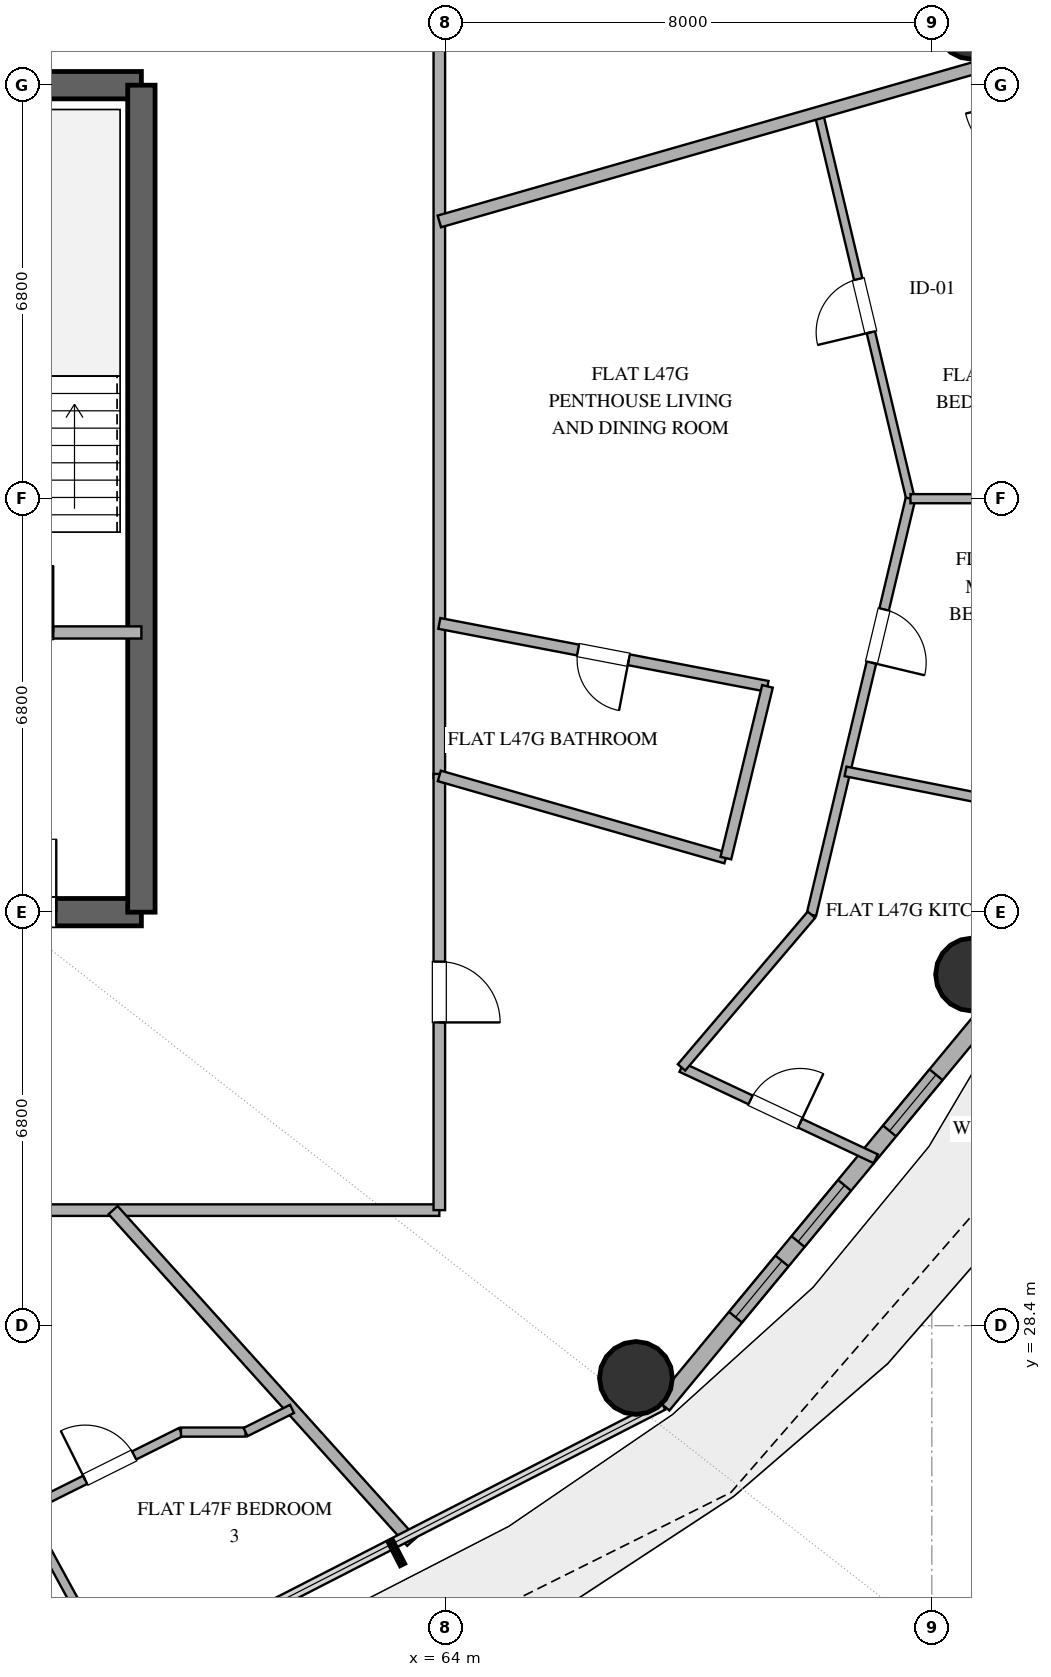
"""IFC4 building model, lengths in metres.
Left out: names, types, materials, properties, quantities, classifications, styles, units other than length and angle.
Written with IfcOpenShell. Run it as: python <this file> out.ifc"""

import sys

from ifc_helpers import new_model, si_unit, direction, frame, frame_2d, origin, origin_2d, place, context, subcontext, project, spatial, rectangle, hollow_circle, extrude, element, fill, save


model = new_model("IFC4")
c1 = context("Model", 3, precision=1e-05, world=origin(), true_north=direction((0.0, 1.0)))
c2 = subcontext(c1, "Body", "Model", "MODEL_VIEW")
j1 = project(units=[si_unit("LENGTHUNIT", "METRE"), si_unit("PLANEANGLEUNIT", "RADIAN")], contexts=[c1])
p1 = place(None, origin())
s1 = spatial("IfcSite", under=j1, at=p1, CompositionType="ELEMENT")
p2 = place(p1, origin())
s2 = spatial("IfcBuilding", under=s1, at=p2, CompositionType="ELEMENT")
p3 = place(p2, frame((0.0, 0.0, 186.6)))
s3 = spatial("IfcBuildingStorey", under=s2, at=p3, CompositionType="ELEMENT", Elevation=186.6)
p4 = place(p3, frame((55.0, 35.2, 0.0), z_axis=(0.0, 0.0, 1.0), x_axis=(1.0, 0.0, 0.0)))
e1 = element("IfcWall", 1, at=p4, inside=s3, PredefinedType="SHEAR", context=c2, shape_type="SweptSolid", body=[
    extrude(rectangle(XDim=4.0, YDim=0.45, at=frame_2d((2.0, 0.0))), origin(), (0.0, 0.0, 1.0), 3.38),
])
p5 = place(p4, frame((1.4, 0.0, 0.0)))
e2 = element("IfcOpeningElement", 2, at=p5, cuts=e1, PredefinedType="OPENING", context=c2, shape_type="SweptSolid", body=[
    extrude(rectangle(XDim=1.2, YDim=2.15, at=frame_2d((0.6, 1.075))), frame((0.0, 0.235, 0.0), z_axis=(0.0, -1.0, 0.0), x_axis=(1.0, 0.0, 0.0)), (0.0, 0.0, 1.0), 0.47),
])
p6 = place(p3, frame((55.0, 48.8, 0.0), z_axis=(0.0, 0.0, 1.0), x_axis=(1.0, 0.0, 0.0)))
e3 = element("IfcWall", 3, at=p6, inside=s3, PredefinedType="SHEAR", context=c2, shape_type="SweptSolid", body=[
    extrude(rectangle(XDim=4.0, YDim=0.45, at=frame_2d((2.0, 0.0))), origin(), (0.0, 0.0, 1.0), 3.38),
])
p7 = place(p3, frame((59.0, 35.2, 0.0), z_axis=(0.0, 0.0, 1.0), x_axis=(0.0, 1.0, 0.0)))
e4 = element("IfcWall", 4, at=p7, inside=s3, PredefinedType="SHEAR", context=c2, shape_type="SweptSolid", body=[
    extrude(rectangle(XDim=13.6, YDim=0.45, at=frame_2d((6.8, 0.0))), origin(), (0.0, 0.0, 1.0), 3.38),
])
for number, where, z_axis, x_axis in (
    (5, (72.662, 49.826, 0.0), (0.0, 0.0, 1.0), (1.0, 0.0, 0.0)),
    (6, (67.134, 27.54, 0.0), (0.0, 0.0, 1.0), (1.0, 0.0, 0.0)),
    (7, (72.662, 34.174, 0.0), (0.0, 0.0, 1.0), (1.0, 0.0, 0.0)),
):
    element("IfcColumn", number, at=place(p3, frame(where, z_axis=z_axis, x_axis=x_axis)), inside=s3, PredefinedType="COLUMN", context=c2, shape_type="SweptSolid", body=[
        extrude(hollow_circle(Radius=0.6, WallThickness=0.032, at=origin_2d()), origin(), (0.0, 0.0, 1.0), 3.38),
    ])
p8 = place(p3, frame((67.576, 27.094, 0.0), z_axis=(0.0, 0.0, 1.0), x_axis=(0.637333477683, 0.770588111915, 0.0)))
e8 = element("IfcWall", 8, at=p8, inside=s3, PredefinedType="SOLIDWALL", context=c2, shape_type="SweptSolid", body=[
    extrude(rectangle(XDim=8.875, YDim=0.28, at=frame_2d((4.438, 0.0))), origin(), (0.0, 0.0, 1.0), 3.38),
])
p9 = place(p8, frame((1.875, 0.0, 0.85)))
e9 = element("IfcOpeningElement", 9, at=p9, cuts=e8, PredefinedType="OPENING", context=c2, shape_type="SweptSolid", body=[
    extrude(rectangle(XDim=1.2, YDim=1.8, at=frame_2d((0.6, 0.9))), frame((0.0, 0.15, 0.0), z_axis=(0.0, -1.0, 0.0), x_axis=(1.0, 0.0, 0.0)), (0.0, 0.0, 1.0), 0.3),
])
p10 = place(p8, frame((3.489, 0.0, 0.85)))
e10 = element("IfcOpeningElement", 10, at=p10, cuts=e8, PredefinedType="OPENING", context=c2, shape_type="SweptSolid", body=[
    extrude(rectangle(XDim=1.2, YDim=1.8, at=frame_2d((0.6, 0.9))), frame((0.0, 0.15, 0.0), z_axis=(0.0, -1.0, 0.0), x_axis=(1.0, 0.0, 0.0)), (0.0, 0.0, 1.0), 0.3),
])
p11 = place(p8, frame((5.85, 0.0, 0.85)))
e11 = element("IfcOpeningElement", 11, at=p11, cuts=e8, PredefinedType="OPENING", context=c2, shape_type="SweptSolid", body=[
    extrude(rectangle(XDim=1.2, YDim=1.6, at=frame_2d((0.6, 0.8))), frame((0.0, 0.15, 0.0), z_axis=(0.0, -1.0, 0.0), x_axis=(1.0, 0.0, 0.0)), (0.0, 0.0, 1.0), 0.3),
])
p12 = place(p3, frame((55.0, 39.8, 0.0), z_axis=(0.0, 0.0, 1.0), x_axis=(1.0, 0.0, 0.0)))
e12 = element("IfcWall", 12, at=p12, inside=s3, PredefinedType="SOLIDWALL", context=c2, shape_type="SweptSolid", body=[
    extrude(rectangle(XDim=4.0, YDim=0.2, at=frame_2d((2.0, 0.0))), origin(), (0.0, 0.0, 1.0), 2.74),
])
p13 = place(p12, frame((1.45, 0.0, 0.0)))
e13 = element("IfcOpeningElement", 13, at=p13, cuts=e12, PredefinedType="OPENING", context=c2, shape_type="SweptSolid", body=[
    extrude(rectangle(XDim=1.1, YDim=2.15, at=frame_2d((0.55, 1.075))), frame((0.0, 0.11, 0.0), z_axis=(0.0, -1.0, 0.0), x_axis=(1.0, 0.0, 0.0)), (0.0, 0.0, 1.0), 0.22),
])
p14 = place(p3, frame((46.818, 30.3, 0.0), z_axis=(0.0, 0.0, 1.0), x_axis=(1.0, 0.0, 0.0)))
e14 = element("IfcWall", 14, at=p14, inside=s3, PredefinedType="PARTITIONING", context=c2, shape_type="SweptSolid", body=[
    extrude(rectangle(XDim=17.082, YDim=0.19, at=frame_2d((8.541, 0.0))), origin(), (0.0, 0.0, 1.0), 2.74),
])
p15 = place(p14, frame((5.358, 0.0, 0.0)))
e15 = element("IfcOpeningElement", 15, at=p15, cuts=e14, PredefinedType="OPENING", context=c2, shape_type="SweptSolid", body=[
    extrude(rectangle(XDim=1.0, YDim=2.2, at=frame_2d((0.5, 1.1))), frame((0.0, 0.105, 0.0), z_axis=(0.0, -1.0, 0.0), x_axis=(1.0, 0.0, 0.0)), (0.0, 0.0, 1.0), 0.21),
])
p16 = place(p3, frame((63.9, 53.7, 0.0), z_axis=(0.0, 0.0, 1.0), x_axis=(0.0, -1.0, 0.0)))
e16 = element("IfcWall", 16, at=p16, inside=s3, PredefinedType="PARTITIONING", context=c2, shape_type="SweptSolid", body=[
    extrude(rectangle(XDim=16.292, YDim=0.19, at=frame_2d((8.146, 0.0))), origin(), (0.0, 0.0, 1.0), 2.74),
])
p17 = place(p16, frame((3.087, 0.0, 0.0)))
e17 = element("IfcOpeningElement", 17, at=p17, cuts=e16, PredefinedType="OPENING", context=c2, shape_type="SweptSolid", body=[
    extrude(rectangle(XDim=1.0, YDim=2.2, at=frame_2d((0.5, 1.1))), frame((0.0, 0.105, 0.0), z_axis=(0.0, -1.0, 0.0), x_axis=(1.0, 0.0, 0.0)), (0.0, 0.0, 1.0), 0.21),
])
p18 = place(p3, frame((63.9, 37.474, 0.0), z_axis=(0.0, 0.0, 1.0), x_axis=(0.0, -1.0, 0.0)))
e18 = element("IfcWall", 18, at=p18, inside=s3, PredefinedType="PARTITIONING", context=c2, shape_type="SweptSolid", body=[
    extrude(rectangle(XDim=7.174, YDim=0.19, at=frame_2d((3.587, 0.0))), origin(), (0.0, 0.0, 1.0), 2.74),
])
p19 = place(p18, frame((3.087, 0.0, 0.0)))
e19 = element("IfcOpeningElement", 19, at=p19, cuts=e18, PredefinedType="OPENING", context=c2, shape_type="SweptSolid", body=[
    extrude(rectangle(XDim=1.0, YDim=2.2, at=frame_2d((0.5, 1.1))), frame((0.0, 0.105, 0.0), z_axis=(0.0, -1.0, 0.0), x_axis=(1.0, 0.0, 0.0)), (0.0, 0.0, 1.0), 0.21),
])
p20 = place(p3, frame((71.649, 42.0, 0.0), z_axis=(0.0, 0.0, 1.0), x_axis=(-0.231639074409, 0.972801798522, 0.0)))
e20 = element("IfcWall", 20, at=p20, inside=s3, PredefinedType="PARTITIONING", context=c2, shape_type="SweptSolid", body=[
    extrude(rectangle(XDim=6.525, YDim=0.14, at=frame_2d((3.263, 0.0))), origin(), (0.0, 0.0, 1.0), 2.74),
])
p21 = place(p20, frame((2.812, 0.0, 0.0)))
e21 = element("IfcOpeningElement", 21, at=p21, cuts=e20, PredefinedType="OPENING", context=c2, shape_type="SweptSolid", body=[
    extrude(rectangle(XDim=0.9, YDim=2.1, at=frame_2d((0.45, 1.05))), frame((0.0, 0.08, 0.0), z_axis=(0.0, -1.0, 0.0), x_axis=(1.0, 0.0, 0.0)), (0.0, 0.0, 1.0), 0.16),
])
p22 = place(p3, frame((73.528, 49.32, 0.0), z_axis=(0.0, 0.0, 1.0), x_axis=(-0.961265987417, -0.275622389211, 0.0)))
e22 = element("IfcWall", 22, at=p22, inside=s3, PredefinedType="PARTITIONING", context=c2, shape_type="SweptSolid", body=[
    extrude(rectangle(XDim=10.016, YDim=0.2, at=frame_2d((5.008, 0.0))), origin(), (0.0, 0.0, 1.0), 2.74),
])
p23 = place(p3, frame((69.297, 38.914, 0.0), z_axis=(0.0, 0.0, 1.0), x_axis=(-0.982108019882, 0.188318446478, 0.0)))
e23 = element("IfcWall", 23, at=p23, inside=s3, PredefinedType="PLUMBINGWALL", context=c2, shape_type="SweptSolid", body=[
    extrude(rectangle(XDim=5.496, YDim=0.18, at=frame_2d((2.748, 0.0))), origin(), (0.0, 0.0, 1.0), 2.74),
])
p24 = place(p23, frame((2.323, 0.0, 0.0)))
e24 = element("IfcOpeningElement", 24, at=p24, cuts=e23, PredefinedType="OPENING", context=c2, shape_type="SweptSolid", body=[
    extrude(rectangle(XDim=0.85, YDim=2.1, at=frame_2d((0.425, 1.05))), frame((0.0, 0.1, 0.0), z_axis=(0.0, -1.0, 0.0), x_axis=(1.0, 0.0, 0.0)), (0.0, 0.0, 1.0), 0.2),
])
p25 = place(p3, frame((63.9, 37.441, 0.0), z_axis=(0.0, 0.0, 1.0), x_axis=(0.961266088446, -0.27562203686, 0.0)))
e25 = element("IfcWall", 25, at=p25, inside=s3, PredefinedType="PLUMBINGWALL", context=c2, shape_type="SweptSolid", body=[
    extrude(rectangle(XDim=4.903, YDim=0.18, at=frame_2d((2.451, 0.0))), origin(), (0.0, 0.0, 1.0), 2.74),
])
p26 = place(p3, frame((71.649, 42.0, 0.0), z_axis=(0.0, 0.0, 1.0), x_axis=(-0.231625219966, -0.972805097373, 0.0)))
e26 = element("IfcWall", 26, at=p26, inside=s3, PredefinedType="PLUMBINGWALL", context=c2, shape_type="SweptSolid", body=[
    extrude(rectangle(XDim=7.033, YDim=0.16, at=frame_2d((3.517, 0.0))), origin(), (0.0, 0.0, 1.0), 2.74),
])
p27 = place(p26, frame((1.871, 0.0, 0.0)))
e27 = element("IfcOpeningElement", 27, at=p27, cuts=e26, PredefinedType="OPENING", context=c2, shape_type="SweptSolid", body=[
    extrude(rectangle(XDim=0.9, YDim=2.1, at=frame_2d((0.45, 1.05))), frame((0.0, 0.09, 0.0), z_axis=(0.0, -1.0, 0.0), x_axis=(1.0, 0.0, 0.0)), (0.0, 0.0, 1.0), 0.18),
])
p28 = place(p3, frame((63.445, 24.846, 0.0), z_axis=(0.0, 0.0, 1.0), x_axis=(-0.669111750453, 0.743161802979, 0.0)))
e28 = element("IfcWall", 28, at=p28, inside=s3, PredefinedType="PARTITIONING", context=c2, shape_type="SweptSolid", body=[
    extrude(rectangle(XDim=7.339, YDim=0.2, at=frame_2d((3.669, 0.0))), origin(), (0.0, 0.0, 1.0), 2.74),
])
p29 = place(p3, frame((75.219, 42.0, 0.0), z_axis=(0.0, 0.0, 1.0), x_axis=(-1.0, 0.0, 0.0)))
e29 = element("IfcWall", 29, at=p29, inside=s3, PredefinedType="PARTITIONING", context=c2, shape_type="SweptSolid", body=[
    extrude(rectangle(XDim=3.571, YDim=0.15, at=frame_2d((1.785, 0.0))), origin(), (0.0, 0.0, 1.0), 2.74),
])
p30 = place(p3, frame((67.883, 32.647, 0.0), z_axis=(0.0, 0.0, 1.0), x_axis=(0.904904903403, -0.425613810628, 0.0)))
e30 = element("IfcWall", 30, at=p30, inside=s3, PredefinedType="PLUMBINGWALL", context=c2, shape_type="SweptSolid", body=[
    extrude(rectangle(XDim=3.53, YDim=0.16, at=frame_2d((1.765, 0.0))), origin(), (0.0, 0.0, 1.0), 2.74),
])
p31 = place(p30, frame((1.255, 0.0, 0.0)))
e31 = element("IfcOpeningElement", 31, at=p31, cuts=e30, PredefinedType="OPENING", context=c2, shape_type="SweptSolid", body=[
    extrude(rectangle(XDim=0.9, YDim=2.1, at=frame_2d((0.45, 1.05))), frame((0.0, 0.09, 0.0), z_axis=(0.0, -1.0, 0.0), x_axis=(1.0, 0.0, 0.0)), (0.0, 0.0, 1.0), 0.18),
])
p32 = place(p3, frame((74.026, 36.831, 0.0), z_axis=(0.0, 0.0, 1.0), x_axis=(-0.980839121604, 0.194819448544, 0.0)))
e32 = element("IfcWall", 32, at=p32, inside=s3, PredefinedType="PLUMBINGWALL", context=c2, shape_type="SweptSolid", body=[
    extrude(rectangle(XDim=3.513, YDim=0.16, at=frame_2d((1.756, 0.0))), origin(), (0.0, 0.0, 1.0), 2.74),
])
p33 = place(p3, frame((57.037, 25.442, 0.0), z_axis=(0.0, 0.0, 1.0), x_axis=(0.479035633035, -0.877795455834, 0.0)))
e33 = element("IfcWall", 33, at=p33, inside=s3, PredefinedType="PARTITIONING", context=c2, shape_type="SweptSolid", body=[
    extrude(rectangle(XDim=3.449, YDim=0.15, at=frame_2d((1.724, 0.0))), origin(), (0.0, 0.0, 1.0), 2.74),
])
p34 = place(p3, frame((70.02, 35.158, 0.0), z_axis=(0.0, 0.0, 1.0), x_axis=(-0.648054655451, -0.761593831086, 0.0)))
e34 = element("IfcWall", 34, at=p34, inside=s3, PredefinedType="PLUMBINGWALL", context=c2, shape_type="SweptSolid", body=[
    extrude(rectangle(XDim=3.296, YDim=0.16, at=frame_2d((1.648, 0.0))), origin(), (0.0, 0.0, 1.0), 2.74),
])
p35 = place(p3, frame((68.613, 36.089, 0.0), z_axis=(0.0, 0.0, 1.0), x_axis=(0.235491818528, 0.971876331334, 0.0)))
e35 = element("IfcWall", 35, at=p35, inside=s3, PredefinedType="PLUMBINGWALL", context=c2, shape_type="SweptSolid", body=[
    extrude(rectangle(XDim=2.906, YDim=0.18, at=frame_2d((1.453, 0.0))), origin(), (0.0, 0.0, 1.0), 2.74),
])
p36 = place(p3, frame((57.305, 25.481, 0.0), z_axis=(0.0, 0.0, 1.0), x_axis=(0.895041110332, 0.445983644112, 0.0)))
e36 = element("IfcWall", 36, at=p36, inside=s3, PredefinedType="PARTITIONING", context=c2, shape_type="SweptSolid", body=[
    extrude(rectangle(XDim=2.621, YDim=0.15, at=frame_2d((1.311, 0.0))), origin(), (0.0, 0.0, 1.0), 2.74),
])
p37 = place(p36, frame((0.861, 0.0, 0.0)))
e37 = element("IfcOpeningElement", 37, at=p37, cuts=e36, PredefinedType="OPENING", context=c2, shape_type="SweptSolid", body=[
    extrude(rectangle(XDim=0.9, YDim=2.1, at=frame_2d((0.45, 1.05))), frame((0.0, 0.085, 0.0), z_axis=(0.0, -1.0, 0.0), x_axis=(1.0, 0.0, 0.0)), (0.0, 0.0, 1.0), 0.17),
])
p38 = place(p3, frame((59.651, 26.65, 0.0), z_axis=(0.0, 0.0, 1.0), x_axis=(1.0, 0.0, 0.0)))
e38 = element("IfcWall", 38, at=p38, inside=s3, PredefinedType="PARTITIONING", context=c2, shape_type="SweptSolid", body=[
    extrude(rectangle(XDim=1.062, YDim=0.15, at=frame_2d((0.531, 0.0))), origin(), (0.0, 0.0, 1.0), 2.74),
])
p39 = place(p3, frame((60.713, 26.65, 0.0), z_axis=(0.0, 0.0, 1.0), x_axis=(0.894826947278, 0.446413188006, 0.0)))
e39 = element("IfcWall", 39, at=p39, inside=s3, PredefinedType="PARTITIONING", context=c2, shape_type="SweptSolid", body=[
    extrude(rectangle(XDim=0.854, YDim=0.15, at=frame_2d((0.427, 0.0))), origin(), (0.0, 0.0, 1.0), 2.74),
])
p40 = place(p9, origin())
e40 = element("IfcWindow", 40, at=p40, inside=s3, PartitioningType="SINGLE_PANEL", PredefinedType="WINDOW", context=c2, shape_type="SweptSolid", body=[
    extrude(rectangle(XDim=1.2, YDim=1.8, at=frame_2d((0.6, 0.9))), frame((0.0, 0.03, 0.0), z_axis=(0.0, -1.0, 0.0), x_axis=(1.0, 0.0, 0.0)), (0.0, 0.0, 1.0), 0.06),
])
fill(e9, e40)
p41 = place(p10, origin())
e41 = element("IfcWindow", 41, at=p41, inside=s3, PartitioningType="SINGLE_PANEL", PredefinedType="WINDOW", context=c2, shape_type="SweptSolid", body=[
    extrude(rectangle(XDim=1.2, YDim=1.8, at=frame_2d((0.6, 0.9))), frame((0.0, 0.03, 0.0), z_axis=(0.0, -1.0, 0.0), x_axis=(1.0, 0.0, 0.0)), (0.0, 0.0, 1.0), 0.06),
])
fill(e10, e41)
p42 = place(p11, origin())
e42 = element("IfcWindow", 42, at=p42, inside=s3, PartitioningType="SINGLE_PANEL", PredefinedType="WINDOW", context=c2, shape_type="SweptSolid", body=[
    extrude(rectangle(XDim=1.2, YDim=1.6, at=frame_2d((0.6, 0.8))), frame((0.0, 0.03, 0.0), z_axis=(0.0, -1.0, 0.0), x_axis=(1.0, 0.0, 0.0)), (0.0, 0.0, 1.0), 0.06),
])
fill(e11, e42)
p43 = place(p5, origin())
e43 = element("IfcDoor", 43, at=p43, inside=s3, OperationType="SINGLE_SWING_RIGHT", PredefinedType="DOOR", context=c2, shape_type="SweptSolid", body=[
    extrude(rectangle(XDim=1.2, YDim=2.15, at=frame_2d((0.6, 1.075))), frame((0.0, 0.025, 0.0), z_axis=(0.0, -1.0, 0.0), x_axis=(1.0, 0.0, 0.0)), (0.0, 0.0, 1.0), 0.05),
])
fill(e2, e43)
p44 = place(p13, origin())
e44 = element("IfcDoor", 44, at=p44, inside=s3, OperationType="SINGLE_SWING_RIGHT", PredefinedType="DOOR", context=c2, shape_type="SweptSolid", body=[
    extrude(rectangle(XDim=1.1, YDim=2.15, at=frame_2d((0.55, 1.075))), frame((0.0, 0.025, 0.0), z_axis=(0.0, -1.0, 0.0), x_axis=(1.0, 0.0, 0.0)), (0.0, 0.0, 1.0), 0.05),
])
fill(e13, e44)
p45 = place(p19, origin())
e45 = element("IfcDoor", 45, at=p45, inside=s3, OperationType="SINGLE_SWING_RIGHT", PredefinedType="DOOR", context=c2, shape_type="SweptSolid", body=[
    extrude(rectangle(XDim=1.0, YDim=2.2, at=frame_2d((0.5, 1.1))), frame((0.0, 0.025, 0.0), z_axis=(0.0, -1.0, 0.0), x_axis=(1.0, 0.0, 0.0)), (0.0, 0.0, 1.0), 0.05),
])
fill(e19, e45)
p46 = place(p21, origin())
e46 = element("IfcDoor", 46, at=p46, inside=s3, OperationType="SINGLE_SWING_LEFT", PredefinedType="DOOR", context=c2, shape_type="SweptSolid", body=[
    extrude(rectangle(XDim=0.9, YDim=2.1, at=frame_2d((0.45, 1.05))), frame((0.0, 0.025, 0.0), z_axis=(0.0, -1.0, 0.0), x_axis=(1.0, 0.0, 0.0)), (0.0, 0.0, 1.0), 0.05),
])
fill(e21, e46)
p47 = place(p24, origin())
e47 = element("IfcDoor", 47, at=p47, inside=s3, OperationType="SINGLE_SWING_LEFT", PredefinedType="DOOR", context=c2, shape_type="SweptSolid", body=[
    extrude(rectangle(XDim=0.85, YDim=2.1, at=frame_2d((0.425, 1.05))), frame((0.0, 0.025, 0.0), z_axis=(0.0, -1.0, 0.0), x_axis=(1.0, 0.0, 0.0)), (0.0, 0.0, 1.0), 0.05),
])
fill(e24, e47)
p48 = place(p27, origin())
e48 = element("IfcDoor", 48, at=p48, inside=s3, OperationType="SINGLE_SWING_RIGHT", PredefinedType="DOOR", context=c2, shape_type="SweptSolid", body=[
    extrude(rectangle(XDim=0.9, YDim=2.1, at=frame_2d((0.45, 1.05))), frame((0.0, 0.025, 0.0), z_axis=(0.0, -1.0, 0.0), x_axis=(1.0, 0.0, 0.0)), (0.0, 0.0, 1.0), 0.05),
])
fill(e27, e48)
p49 = place(p31, origin())
e49 = element("IfcDoor", 49, at=p49, inside=s3, OperationType="SINGLE_SWING_RIGHT", PredefinedType="DOOR", context=c2, shape_type="SweptSolid", body=[
    extrude(rectangle(XDim=0.9, YDim=2.1, at=frame_2d((0.45, 1.05))), frame((0.0, 0.025, 0.0), z_axis=(0.0, -1.0, 0.0), x_axis=(1.0, 0.0, 0.0)), (0.0, 0.0, 1.0), 0.05),
])
fill(e31, e49)
p50 = place(p37, origin())
e50 = element("IfcDoor", 50, at=p50, inside=s3, OperationType="SINGLE_SWING_LEFT", PredefinedType="DOOR", context=c2, shape_type="SweptSolid", body=[
    extrude(rectangle(XDim=0.9, YDim=2.1, at=frame_2d((0.45, 1.05))), frame((0.0, 0.025, 0.0), z_axis=(0.0, -1.0, 0.0), x_axis=(1.0, 0.0, 0.0)), (0.0, 0.0, 1.0), 0.05),
])
fill(e37, e50)
save(model, sys.argv[1])
